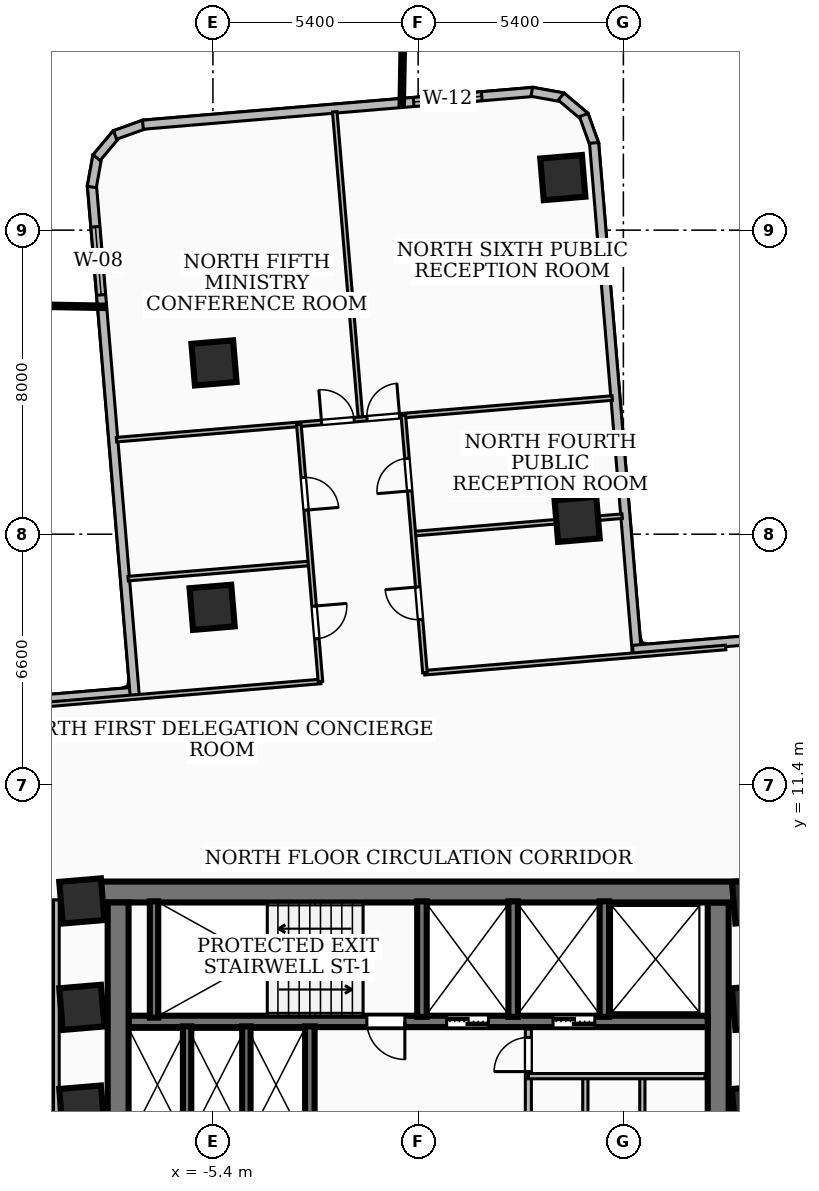
"""IFC4 building model, lengths in metres.
Left out: names, types, materials, properties, quantities, classifications, styles, units other than length and angle.
Written with IfcOpenShell. Run it as: python <this file> out.ifc"""

import sys

from ifc_helpers import new_model, si_unit, direction, frame, frame_2d, origin, origin_2d, place, context, subcontext, project, spatial, rectangle, extrude, element, fill, save


model = new_model("IFC4")
c1 = context("Model", 3, precision=1e-05, world=origin(), true_north=direction((0.0, 1.0)))
c2 = subcontext(c1, "Body", "Model", "MODEL_VIEW")
j1 = project(units=[si_unit("LENGTHUNIT", "METRE"), si_unit("PLANEANGLEUNIT", "RADIAN")], contexts=[c1])
p1 = place(None, origin())
s1 = spatial("IfcSite", under=j1, at=p1, CompositionType="ELEMENT")
p2 = place(p1, origin())
s2 = spatial("IfcBuilding", under=s1, at=p2, CompositionType="ELEMENT")
p3 = place(p2, frame((0.0, 0.0, 64.08)))
s3 = spatial("IfcBuildingStorey", under=s2, at=p3, CompositionType="ELEMENT", Elevation=64.08)
p4 = place(p3, frame((-8.78, 8.585, 0.0), z_axis=(0.0, 0.0, 1.0), x_axis=(1.0, 0.0, 0.0)))
e1 = element("IfcWall", 1, at=p4, inside=s3, PredefinedType="SHEAR", context=c2, shape_type="SweptSolid", body=[
    extrude(rectangle(XDim=17.56, YDim=0.55, at=frame_2d((8.78, 0.0))), origin(), (0.0, 0.0, 1.0), 3.34),
])
for number, where, z_axis, x_axis in (
    (2, (-7.895, 2.025, 0.0), (0.0, 0.0, 1.0), (0.0, 1.0, 0.0)),
    (3, (7.895, 8.31, 0.0), (0.0, 0.0, 1.0), (0.0, -1.0, 0.0)),
):
    element("IfcWall", number, at=place(p3, frame(where, z_axis=z_axis, x_axis=x_axis)), inside=s3, PredefinedType="SHEAR", context=c2, shape_type="SweptSolid", body=[
        extrude(rectangle(XDim=6.285, YDim=0.55, at=frame_2d((3.143, 0.0))), origin(), (0.0, 0.0, 1.0), 3.34),
    ])
p5 = place(p3, frame((7.62, 5.18, 0.0), z_axis=(0.0, 0.0, 1.0), x_axis=(-1.0, 0.0, 0.0)))
e4 = element("IfcWall", 4, at=p5, inside=s3, PredefinedType="SOLIDWALL", context=c2, shape_type="SweptSolid", body=[
    extrude(rectangle(XDim=15.24, YDim=0.3, at=frame_2d((7.62, 0.0))), origin(), (0.0, 0.0, 1.0), 3.34),
])
p6 = place(p5, frame((5.77, 0.0, 0.0)))
e5 = element("IfcOpeningElement", 5, at=p6, cuts=e4, PredefinedType="OPENING", context=c2, shape_type="SweptSolid", body=[
    extrude(rectangle(XDim=1.1, YDim=2.15, at=frame_2d((0.55, 1.075))), frame((0.0, 0.16, 0.0), z_axis=(0.0, -1.0, 0.0), x_axis=(1.0, 0.0, 0.0)), (0.0, 0.0, 1.0), 0.32),
])
p7 = place(p5, frame((2.97, 0.0, 0.0)))
e6 = element("IfcOpeningElement", 6, at=p7, cuts=e4, PredefinedType="OPENING", context=c2, shape_type="SweptSolid", body=[
    extrude(rectangle(XDim=1.1, YDim=2.15, at=frame_2d((0.55, 1.075))), frame((0.0, 0.16, 0.0), z_axis=(0.0, -1.0, 0.0), x_axis=(1.0, 0.0, 0.0)), (0.0, 0.0, 1.0), 0.32),
])
p8 = place(p5, frame((7.97, 0.0, 0.0)))
e7 = element("IfcOpeningElement", 7, at=p8, cuts=e4, PredefinedType="OPENING", context=c2, shape_type="SweptSolid", body=[
    extrude(rectangle(XDim=1.0, YDim=2.1, at=frame_2d((0.5, 1.05))), frame((0.0, 0.16, 0.0), z_axis=(0.0, -1.0, 0.0), x_axis=(1.0, 0.0, 0.0)), (0.0, 0.0, 1.0), 0.32),
])
p9 = place(p3, frame((-6.95, 5.28, 0.0), z_axis=(0.0, 0.0, 1.0), x_axis=(0.0, 1.0, 0.0)))
e8 = element("IfcWall", 8, at=p9, inside=s3, PredefinedType="SOLIDWALL", context=c2, shape_type="SweptSolid", body=[
    extrude(rectangle(XDim=3.06, YDim=0.22, at=frame_2d((1.53, 0.0))), origin(), (0.0, 0.0, 1.0), 3.34),
])
for number, where, z_axis, x_axis in (
    (9, (0.1, 5.3, 0.0), (0.0, 0.0, 1.0), (0.0, 1.0, 0.0)),
    (10, (2.5, 5.3, 0.0), (0.0, 0.0, 1.0), (0.0, 1.0, 0.0)),
    (11, (4.9, 5.3, 0.0), (0.0, 0.0, 1.0), (0.0, 1.0, 0.0)),
):
    element("IfcWall", number, at=place(p3, frame(where, z_axis=z_axis, x_axis=x_axis)), inside=s3, PredefinedType="SOLIDWALL", context=c2, shape_type="SweptSolid", body=[
        extrude(rectangle(XDim=3.04, YDim=0.25, at=frame_2d((1.52, 0.0))), origin(), (0.0, 0.0, 1.0), 3.34),
    ])
p10 = place(p3, frame((-2.85, 1.98, 0.0), z_axis=(0.0, 0.0, 1.0), x_axis=(0.0, 1.0, 0.0)))
e12 = element("IfcWall", 12, at=p10, inside=s3, PredefinedType="SOLIDWALL", context=c2, shape_type="SweptSolid", body=[
    extrude(rectangle(XDim=3.07, YDim=0.25, at=frame_2d((1.535, 0.0))), origin(), (0.0, 0.0, 1.0), 3.34),
])
for number, where, z_axis, x_axis in (
    (13, (-6.08, 1.98, 0.0), (0.0, 0.0, 1.0), (0.0, 1.0, 0.0)),
    (14, (-4.52, 1.98, 0.0), (0.0, 0.0, 1.0), (0.0, 1.0, 0.0)),
):
    element("IfcWall", number, at=place(p3, frame(where, z_axis=z_axis, x_axis=x_axis)), inside=s3, PredefinedType="SOLIDWALL", context=c2, shape_type="SweptSolid", body=[
        extrude(rectangle(XDim=3.07, YDim=0.22, at=frame_2d((1.535, 0.0))), origin(), (0.0, 0.0, 1.0), 3.34),
    ])
for number, where, z_axis, x_axis in (
    (15, (-8.85, 2.9, 0.0), (0.0, 0.0, 1.0), (0.996, 0.084, 0.0)),
    (16, (-8.85, 5.55, 0.0), (0.0, 0.0, 1.0), (0.996, 0.084, 0.0)),
    (17, (8.85, 2.9, 0.0), (0.0, 0.0, 1.0), (0.996, 0.084, 0.0)),
    (18, (8.85, 5.55, 0.0), (0.0, 0.0, 1.0), (0.996, 0.084, 0.0)),
    (19, (-8.85, 8.35, 0.0), (0.0, 0.0, 1.0), (0.996, 0.084, 0.0)),
    (20, (8.85, 8.35, 0.0), (0.0, 0.0, 1.0), (0.996, 0.084, 0.0)),
    (21, (4.184, 18.391, 0.0), (0.0, 0.0, 1.0), (0.996, 0.084, 0.0)),
    (22, (-5.421, 16.076, 0.0), (0.0, 0.0, 1.0), (0.996, 0.084, 0.0)),
    (23, (3.807, 27.383, 0.0), (0.0, 0.0, 1.0), (0.996, 0.084, 0.0)),
    (24, (-5.372, 22.507, 0.0), (0.0, 0.0, 1.0), (0.996, 0.084, 0.0)),
):
    element("IfcColumn", number, at=place(p3, frame(where, z_axis=z_axis, x_axis=x_axis)), inside=s3, PredefinedType="COLUMN", context=c2, shape_type="SweptSolid", body=[
        extrude(rectangle(XDim=1.1, YDim=1.1, at=origin_2d()), origin(), (0.0, 0.0, 1.0), 3.6),
    ])
p11 = place(p3, frame((-14.121, 13.295, 0.0), z_axis=(0.0, 0.0, 1.0), x_axis=(0.99648986367, 0.083713509088, 0.0)))
e25 = element("IfcWall", 25, at=p11, inside=s3, PredefinedType="SOLIDWALL", context=c2, shape_type="SweptSolid", body=[
    extrude(rectangle(XDim=6.775, YDim=0.24, at=frame_2d((3.387, 0.0))), origin(), (0.0, 0.0, 1.0), 3.34),
])
p12 = place(p3, frame((-7.458, 13.758, 0.0), z_axis=(0.0, 0.0, 1.0), x_axis=(-0.083631732273, 0.996496730229, 0.0)))
e26 = element("IfcWall", 26, at=p12, inside=s3, PredefinedType="SOLIDWALL", context=c2, shape_type="SweptSolid", body=[
    extrude(rectangle(XDim=13.475, YDim=0.24, at=frame_2d((6.738, 0.0))), origin(), (0.0, 0.0, 1.0), 3.34),
])
p13 = place(p12, frame((10.575, 0.0, 0.85)))
e27 = element("IfcOpeningElement", 27, at=p13, cuts=e26, PredefinedType="OPENING", context=c2, shape_type="SweptSolid", body=[
    extrude(rectangle(XDim=1.8, YDim=1.8, at=frame_2d((0.9, 0.9))), frame((0.0, 0.13, 0.0), z_axis=(0.0, -1.0, 0.0), x_axis=(1.0, 0.0, 0.0)), (0.0, 0.0, 1.0), 0.26),
])
p14 = place(p3, frame((-8.587, 27.136, 0.0), z_axis=(0.0, 0.0, 1.0), x_axis=(0.175678791378, 0.98444754165, 0.0)))
e28 = element("IfcWall", 28, at=p14, inside=s3, PredefinedType="SOLIDWALL", context=c2, shape_type="SweptSolid", body=[
    extrude(rectangle(XDim=0.831, YDim=0.24, at=frame_2d((0.416, 0.0))), origin(), (0.0, 0.0, 1.0), 3.34),
])
p15 = place(p3, frame((-8.461, 27.91, 0.0), z_axis=(0.0, 0.0, 1.0), x_axis=(0.644892840611, 0.764273003664, 0.0)))
e29 = element("IfcWall", 29, at=p15, inside=s3, PredefinedType="SOLIDWALL", context=c2, shape_type="SweptSolid", body=[
    extrude(rectangle(XDim=0.814, YDim=0.24, at=frame_2d((0.407, 0.0))), origin(), (0.0, 0.0, 1.0), 3.34),
])
p16 = place(p3, frame((-7.976, 28.505, 0.0), z_axis=(0.0, 0.0, 1.0), x_axis=(0.941455621898, 0.337136933599, 0.0)))
e30 = element("IfcWall", 30, at=p16, inside=s3, PredefinedType="SOLIDWALL", context=c2, shape_type="SweptSolid", body=[
    extrude(rectangle(XDim=0.831, YDim=0.24, at=frame_2d((0.415, 0.0))), origin(), (0.0, 0.0, 1.0), 3.34),
])
p17 = place(p3, frame((-7.243, 28.775, 0.0), z_axis=(0.0, 0.0, 1.0), x_axis=(0.996496471002, 0.083634820983, 0.0)))
e31 = element("IfcWall", 31, at=p17, inside=s3, PredefinedType="SOLIDWALL", context=c2, shape_type="SweptSolid", body=[
    extrude(rectangle(XDim=10.319, YDim=0.24, at=frame_2d((5.16, 0.0))), origin(), (0.0, 0.0, 1.0), 3.34),
])
p18 = place(p17, frame((7.149, 0.0, 0.85)))
e32 = element("IfcOpeningElement", 32, at=p18, cuts=e31, PredefinedType="OPENING", context=c2, shape_type="SweptSolid", body=[
    extrude(rectangle(XDim=1.8, YDim=1.6, at=frame_2d((0.9, 0.8))), frame((0.0, 0.13, 0.0), z_axis=(0.0, -1.0, 0.0), x_axis=(1.0, 0.0, 0.0)), (0.0, 0.0, 1.0), 0.26),
])
p19 = place(p3, frame((2.99, 29.64, 0.0), z_axis=(0.0, 0.0, 1.0), x_axis=(0.98444754165, -0.175678791378, 0.0)))
e33 = element("IfcWall", 33, at=p19, inside=s3, PredefinedType="SOLIDWALL", context=c2, shape_type="SweptSolid", body=[
    extrude(rectangle(XDim=0.831, YDim=0.24, at=frame_2d((0.416, 0.0))), origin(), (0.0, 0.0, 1.0), 3.34),
])
p20 = place(p3, frame((3.764, 29.514, 0.0), z_axis=(0.0, 0.0, 1.0), x_axis=(0.763773335426, -0.645484540553, 0.0)))
e34 = element("IfcWall", 34, at=p20, inside=s3, PredefinedType="SOLIDWALL", context=c2, shape_type="SweptSolid", body=[
    extrude(rectangle(XDim=0.813, YDim=0.24, at=frame_2d((0.407, 0.0))), origin(), (0.0, 0.0, 1.0), 3.34),
])
p21 = place(p3, frame((4.358, 29.029, 0.0), z_axis=(0.0, 0.0, 1.0), x_axis=(0.338178397423, -0.941082021673, 0.0)))
e35 = element("IfcWall", 35, at=p21, inside=s3, PredefinedType="SOLIDWALL", context=c2, shape_type="SweptSolid", body=[
    extrude(rectangle(XDim=0.831, YDim=0.24, at=frame_2d((0.416, 0.0))), origin(), (0.0, 0.0, 1.0), 3.34),
])
p22 = place(p3, frame((4.629, 28.296, 0.0), z_axis=(0.0, 0.0, 1.0), x_axis=(0.083649723304, -0.996495220155, 0.0)))
e36 = element("IfcWall", 36, at=p22, inside=s3, PredefinedType="SOLIDWALL", context=c2, shape_type="SweptSolid", body=[
    extrude(rectangle(XDim=13.475, YDim=0.24, at=frame_2d((6.738, 0.0))), origin(), (0.0, 0.0, 1.0), 2.152),
])
p23 = place(p3, frame((5.652, 14.956, 0.0), z_axis=(0.0, 0.0, 1.0), x_axis=(0.996497087711, 0.083627472659, 0.0)))
e37 = element("IfcWall", 37, at=p23, inside=s3, PredefinedType="SOLIDWALL", context=c2, shape_type="SweptSolid", body=[
    extrude(rectangle(XDim=6.075, YDim=0.24, at=frame_2d((3.038, 0.0))), origin(), (0.0, 0.0, 1.0), 2.072),
])
p24 = place(p3, frame((2.9, 2.04, 0.0), z_axis=(0.0, 0.0, 1.0), x_axis=(0.0, 1.0, 0.0)))
e38 = element("IfcWall", 38, at=p24, inside=s3, PredefinedType="PARTITIONING", context=c2, shape_type="SweptSolid", body=[
    extrude(rectangle(XDim=2.94, YDim=0.16, at=frame_2d((1.47, 0.0))), origin(), (0.0, 0.0, 1.0), 2.405),
])
p25 = place(p24, frame((1.82, 0.0, 0.0)))
e39 = element("IfcOpeningElement", 39, at=p25, cuts=e38, PredefinedType="OPENING", context=c2, shape_type="SweptSolid", body=[
    extrude(rectangle(XDim=0.9, YDim=2.06, at=frame_2d((0.45, 1.03))), frame((0.0, 0.09, 0.0), z_axis=(0.0, -1.0, 0.0), x_axis=(1.0, 0.0, 0.0)), (0.0, 0.0, 1.0), 0.18),
])
p26 = place(p3, frame((2.9, 3.74, 0.0), z_axis=(0.0, 0.0, 1.0), x_axis=(1.0, 0.0, 0.0)))
e40 = element("IfcWall", 40, at=p26, inside=s3, PredefinedType="PARTITIONING", context=c2, shape_type="SweptSolid", body=[
    extrude(rectangle(XDim=4.65, YDim=0.138, at=frame_2d((2.325, 0.0))), origin(), (0.0, 0.0, 1.0), 3.34),
])
for number, where, z_axis, x_axis in (
    (41, (4.4, 1.85, 0.0), (0.0, 0.0, 1.0), (0.0, 1.0, 0.0)),
    (42, (5.9, 1.85, 0.0), (0.0, 0.0, 1.0), (0.0, 1.0, 0.0)),
):
    element("IfcWall", number, at=place(p3, frame(where, z_axis=z_axis, x_axis=x_axis)), inside=s3, PredefinedType="PARTITIONING", context=c2, shape_type="SweptSolid", body=[
        extrude(rectangle(XDim=1.89, YDim=0.138, at=frame_2d((0.945, 0.0))), origin(), (0.0, 0.0, 1.0), 2.405),
    ])
p27 = place(p3, frame((-9.52, 1.75, 0.0), z_axis=(0.0, 0.0, 1.0), x_axis=(0.0, 1.0, 0.0)))
e43 = element("IfcWall", 43, at=p27, inside=s3, PredefinedType="PARTITIONING", context=c2, shape_type="SweptSolid", body=[
    extrude(rectangle(XDim=6.63, YDim=0.15, at=frame_2d((3.315, 0.0))), origin(), (0.0, 0.0, 1.0), 2.152),
])
p28 = place(p3, frame((-2.561, 14.125, 0.0), z_axis=(0.0, 0.0, 1.0), x_axis=(-0.996501035323, -0.083580419953, 0.0)))
e44 = element("IfcWall", 44, at=p28, inside=s3, PredefinedType="PARTITIONING", context=c2, shape_type="SweptSolid", body=[
    extrude(rectangle(XDim=8.649, YDim=0.12, at=frame_2d((4.325, 0.0))), origin(), (0.0, 0.0, 1.0), 2.152),
])
p29 = place(p3, frame((8.091, 15.02, 0.0), z_axis=(0.0, 0.0, 1.0), x_axis=(-0.99649495528, -0.083652878615, 0.0)))
e45 = element("IfcWall", 45, at=p29, inside=s3, PredefinedType="PARTITIONING", context=c2, shape_type="SweptSolid", body=[
    extrude(rectangle(XDim=7.95, YDim=0.12, at=frame_2d((3.975, 0.0))), origin(), (0.0, 0.0, 1.0), 2.072),
])
p30 = place(p3, frame((-2.852, 17.232, 0.0), z_axis=(0.0, 0.0, 1.0), x_axis=(-0.996498541433, -0.083610148443, 0.0)))
e46 = element("IfcWall", 46, at=p30, inside=s3, PredefinedType="PARTITIONING", context=c2, shape_type="SweptSolid", body=[
    extrude(rectangle(XDim=4.795, YDim=0.12, at=frame_2d((2.397, 0.0))), origin(), (0.0, 0.0, 1.0), 2.152),
])
p31 = place(p3, frame((5.368, 18.474, 0.0), z_axis=(0.0, 0.0, 1.0), x_axis=(-0.996486987726, -0.08374773605, 0.0)))
e47 = element("IfcWall", 47, at=p31, inside=s3, PredefinedType="PARTITIONING", context=c2, shape_type="SweptSolid", body=[
    extrude(rectangle(XDim=5.495, YDim=0.12, at=frame_2d((2.748, 0.0))), origin(), (0.0, 0.0, 1.0), 2.152),
])
p32 = place(p3, frame((-3.139, 20.891, 0.0), z_axis=(0.0, 0.0, 1.0), x_axis=(0.083622669872, -0.996497490756, 0.0)))
e48 = element("IfcWall", 48, at=p32, inside=s3, PredefinedType="PARTITIONING", context=c2, shape_type="SweptSolid", body=[
    extrude(rectangle(XDim=6.791, YDim=0.12, at=frame_2d((3.396, 0.0))), origin(), (0.0, 0.0, 1.0), 2.152),
])
p33 = place(p32, frame((4.801, 0.0, 0.0)))
e49 = element("IfcOpeningElement", 49, at=p33, cuts=e48, PredefinedType="OPENING", context=c2, shape_type="SweptSolid", body=[
    extrude(rectangle(XDim=0.86, YDim=2.04, at=frame_2d((0.43, 1.02))), frame((0.0, 0.07, 0.0), z_axis=(0.0, -1.0, 0.0), x_axis=(1.0, 0.0, 0.0)), (0.0, 0.0, 1.0), 0.14),
])
p34 = place(p32, frame((1.406, 0.0, 0.0)))
e50 = element("IfcOpeningElement", 50, at=p34, cuts=e48, PredefinedType="OPENING", context=c2, shape_type="SweptSolid", body=[
    extrude(rectangle(XDim=0.86, YDim=2.04, at=frame_2d((0.43, 1.02))), frame((0.0, 0.07, 0.0), z_axis=(0.0, -1.0, 0.0), x_axis=(1.0, 0.0, 0.0)), (0.0, 0.0, 1.0), 0.14),
])
p35 = place(p3, frame((0.179, 14.355, 0.0), z_axis=(0.0, 0.0, 1.0), x_axis=(-0.083622669872, 0.996497490756, 0.0)))
e51 = element("IfcWall", 51, at=p35, inside=s3, PredefinedType="PARTITIONING", context=c2, shape_type="SweptSolid", body=[
    extrude(rectangle(XDim=6.791, YDim=0.12, at=frame_2d((3.396, 0.0))), origin(), (0.0, 0.0, 1.0), 2.152),
])
p36 = place(p35, frame((1.405, 0.0, 0.0)))
e52 = element("IfcOpeningElement", 52, at=p36, cuts=e51, PredefinedType="OPENING", context=c2, shape_type="SweptSolid", body=[
    extrude(rectangle(XDim=0.86, YDim=2.04, at=frame_2d((0.43, 1.02))), frame((0.0, 0.07, 0.0), z_axis=(0.0, -1.0, 0.0), x_axis=(1.0, 0.0, 0.0)), (0.0, 0.0, 1.0), 0.14),
])
p37 = place(p35, frame((4.8, 0.0, 0.0)))
e53 = element("IfcOpeningElement", 53, at=p37, cuts=e51, PredefinedType="OPENING", context=c2, shape_type="SweptSolid", body=[
    extrude(rectangle(XDim=0.86, YDim=2.04, at=frame_2d((0.43, 1.02))), frame((0.0, 0.07, 0.0), z_axis=(0.0, -1.0, 0.0), x_axis=(1.0, 0.0, 0.0)), (0.0, 0.0, 1.0), 0.14),
])
p38 = place(p3, frame((-1.52, 21.087, 0.0), z_axis=(0.0, 0.0, 1.0), x_axis=(-0.083680047246, 0.996492674179, 0.0)))
e54 = element("IfcWall", 54, at=p38, inside=s3, PredefinedType="PARTITIONING", context=c2, shape_type="SweptSolid", body=[
    extrude(rectangle(XDim=8.055, YDim=0.12, at=frame_2d((4.028, 0.0))), origin(), (0.0, 0.0, 1.0), 2.152),
])
p39 = place(p3, frame((-7.937, 20.487, 0.0), z_axis=(0.0, 0.0, 1.0), x_axis=(0.996488930494, 0.083724616474, 0.0)))
e55 = element("IfcWall", 55, at=p39, inside=s3, PredefinedType="PARTITIONING", context=c2, shape_type="SweptSolid", body=[
    extrude(rectangle(XDim=13.09, YDim=0.12, at=frame_2d((6.545, 0.0))), origin(), (0.0, 0.0, 1.0), 2.072),
])
p40 = place(p39, frame((6.615, 0.0, 0.0)))
e56 = element("IfcOpeningElement", 56, at=p40, cuts=e55, PredefinedType="OPENING", context=c2, shape_type="SweptSolid", body=[
    extrude(rectangle(XDim=0.86, YDim=2.0, at=frame_2d((0.43, 1.0))), frame((0.0, 0.07, 0.0), z_axis=(0.0, -1.0, 0.0), x_axis=(1.0, 0.0, 0.0)), (0.0, 0.0, 1.0), 0.14),
])
p41 = place(p39, frame((5.415, 0.0, 0.0)))
e57 = element("IfcOpeningElement", 57, at=p41, cuts=e55, PredefinedType="OPENING", context=c2, shape_type="SweptSolid", body=[
    extrude(rectangle(XDim=0.86, YDim=2.0, at=frame_2d((0.43, 1.0))), frame((0.0, 0.07, 0.0), z_axis=(0.0, -1.0, 0.0), x_axis=(1.0, 0.0, 0.0)), (0.0, 0.0, 1.0), 0.14),
])
p42 = place(p13, origin())
e58 = element("IfcWindow", 58, at=p42, inside=s3, PartitioningType="SINGLE_PANEL", PredefinedType="WINDOW", context=c2, shape_type="SweptSolid", body=[
    extrude(rectangle(XDim=1.8, YDim=1.8, at=frame_2d((0.9, 0.9))), frame((0.0, 0.03, 0.0), z_axis=(0.0, -1.0, 0.0), x_axis=(1.0, 0.0, 0.0)), (0.0, 0.0, 1.0), 0.06),
])
fill(e27, e58)
p43 = place(p18, origin())
e59 = element("IfcWindow", 59, at=p43, inside=s3, PartitioningType="SINGLE_PANEL", PredefinedType="WINDOW", context=c2, shape_type="SweptSolid", body=[
    extrude(rectangle(XDim=1.8, YDim=1.6, at=frame_2d((0.9, 0.8))), frame((0.0, 0.03, 0.0), z_axis=(0.0, -1.0, 0.0), x_axis=(1.0, 0.0, 0.0)), (0.0, 0.0, 1.0), 0.06),
])
fill(e32, e59)
p44 = place(p6, origin())
e60 = element("IfcDoor", 60, at=p44, inside=s3, OperationType="DOUBLE_DOOR_SLIDING", PredefinedType="DOOR", context=c2, shape_type="SweptSolid", body=[
    extrude(rectangle(XDim=1.1, YDim=2.15, at=frame_2d((0.55, 1.075))), frame((0.0, 0.025, 0.0), z_axis=(0.0, -1.0, 0.0), x_axis=(1.0, 0.0, 0.0)), (0.0, 0.0, 1.0), 0.05),
])
fill(e5, e60)
p45 = place(p7, origin())
e61 = element("IfcDoor", 61, at=p45, inside=s3, OperationType="DOUBLE_DOOR_SLIDING", PredefinedType="DOOR", context=c2, shape_type="SweptSolid", body=[
    extrude(rectangle(XDim=1.1, YDim=2.15, at=frame_2d((0.55, 1.075))), frame((0.0, 0.025, 0.0), z_axis=(0.0, -1.0, 0.0), x_axis=(1.0, 0.0, 0.0)), (0.0, 0.0, 1.0), 0.05),
])
fill(e6, e61)
p46 = place(p8, origin())
e62 = element("IfcDoor", 62, at=p46, inside=s3, OperationType="SINGLE_SWING_LEFT", PredefinedType="DOOR", context=c2, shape_type="SweptSolid", body=[
    extrude(rectangle(XDim=1.0, YDim=2.1, at=frame_2d((0.5, 1.05))), frame((0.0, 0.025, 0.0), z_axis=(0.0, -1.0, 0.0), x_axis=(1.0, 0.0, 0.0)), (0.0, 0.0, 1.0), 0.05),
])
fill(e7, e62)
p47 = place(p25, origin())
e63 = element("IfcDoor", 63, at=p47, inside=s3, OperationType="SINGLE_SWING_LEFT", PredefinedType="DOOR", context=c2, shape_type="SweptSolid", body=[
    extrude(rectangle(XDim=0.9, YDim=2.06, at=frame_2d((0.45, 1.03))), frame((0.0, 0.025, 0.0), z_axis=(0.0, -1.0, 0.0), x_axis=(1.0, 0.0, 0.0)), (0.0, 0.0, 1.0), 0.05),
])
fill(e39, e63)
p48 = place(p33, origin())
e64 = element("IfcDoor", 64, at=p48, inside=s3, OperationType="SINGLE_SWING_LEFT", PredefinedType="DOOR", context=c2, shape_type="SweptSolid", body=[
    extrude(rectangle(XDim=0.86, YDim=2.04, at=frame_2d((0.43, 1.02))), frame((0.0, 0.025, 0.0), z_axis=(0.0, -1.0, 0.0), x_axis=(1.0, 0.0, 0.0)), (0.0, 0.0, 1.0), 0.05),
])
fill(e49, e64)
p49 = place(p34, origin())
e65 = element("IfcDoor", 65, at=p49, inside=s3, OperationType="SINGLE_SWING_RIGHT", PredefinedType="DOOR", context=c2, shape_type="SweptSolid", body=[
    extrude(rectangle(XDim=0.86, YDim=2.04, at=frame_2d((0.43, 1.02))), frame((0.0, 0.025, 0.0), z_axis=(0.0, -1.0, 0.0), x_axis=(1.0, 0.0, 0.0)), (0.0, 0.0, 1.0), 0.05),
])
fill(e50, e65)
p50 = place(p36, origin())
e66 = element("IfcDoor", 66, at=p50, inside=s3, OperationType="SINGLE_SWING_RIGHT", PredefinedType="DOOR", context=c2, shape_type="SweptSolid", body=[
    extrude(rectangle(XDim=0.86, YDim=2.04, at=frame_2d((0.43, 1.02))), frame((0.0, 0.025, 0.0), z_axis=(0.0, -1.0, 0.0), x_axis=(1.0, 0.0, 0.0)), (0.0, 0.0, 1.0), 0.05),
])
fill(e52, e66)
p51 = place(p37, origin())
e67 = element("IfcDoor", 67, at=p51, inside=s3, OperationType="SINGLE_SWING_LEFT", PredefinedType="DOOR", context=c2, shape_type="SweptSolid", body=[
    extrude(rectangle(XDim=0.86, YDim=2.04, at=frame_2d((0.43, 1.02))), frame((0.0, 0.025, 0.0), z_axis=(0.0, -1.0, 0.0), x_axis=(1.0, 0.0, 0.0)), (0.0, 0.0, 1.0), 0.05),
])
fill(e53, e67)
p52 = place(p40, origin())
e68 = element("IfcDoor", 68, at=p52, inside=s3, OperationType="SINGLE_SWING_RIGHT", PredefinedType="DOOR", context=c2, shape_type="SweptSolid", body=[
    extrude(rectangle(XDim=0.86, YDim=2.0, at=frame_2d((0.43, 1.0))), frame((0.0, 0.025, 0.0), z_axis=(0.0, -1.0, 0.0), x_axis=(1.0, 0.0, 0.0)), (0.0, 0.0, 1.0), 0.05),
])
fill(e56, e68)
p53 = place(p41, origin())
e69 = element("IfcDoor", 69, at=p53, inside=s3, OperationType="SINGLE_SWING_LEFT", PredefinedType="DOOR", context=c2, shape_type="SweptSolid", body=[
    extrude(rectangle(XDim=0.86, YDim=2.0, at=frame_2d((0.43, 1.0))), frame((0.0, 0.025, 0.0), z_axis=(0.0, -1.0, 0.0), x_axis=(1.0, 0.0, 0.0)), (0.0, 0.0, 1.0), 0.05),
])
fill(e57, e69)
save(model, sys.argv[1])
